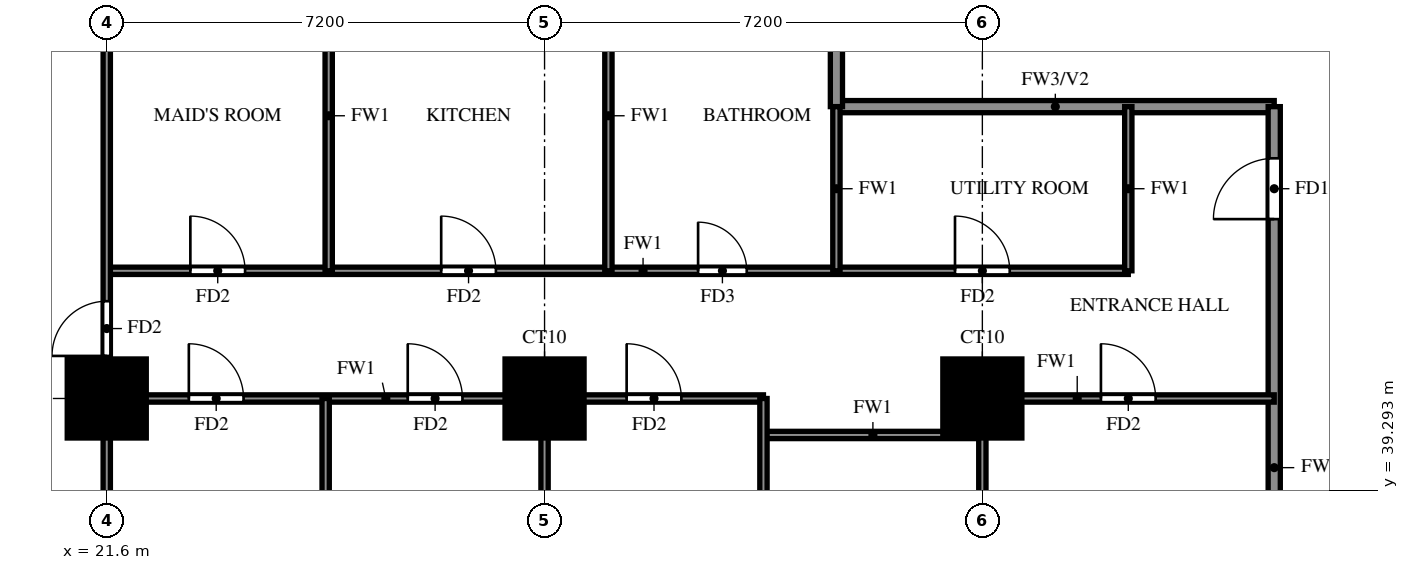
"""IFC4 building model, lengths in metres.
Left out: names, types, materials, properties, quantities, classifications, styles, units other than length and angle.
Written with IfcOpenShell. Run it as: python <this file> out.ifc"""

import sys

from ifc_helpers import new_model, si_unit, direction, frame, frame_2d, origin, origin_2d, place, context, subcontext, project, spatial, rectangle, extrude, source, transform, mapped, element, fill, save


model = new_model("IFC4")
c1 = context("Model", 3, precision=1e-05, world=origin(), true_north=direction((0.0, 1.0)))
c2 = subcontext(c1, "Body", "Model", "MODEL_VIEW")
j1 = project(units=[si_unit("LENGTHUNIT", "METRE"), si_unit("PLANEANGLEUNIT", "RADIAN")], contexts=[c1])
p1 = place(None, origin())
s1 = spatial("IfcSite", under=j1, at=p1, CompositionType="ELEMENT")
p2 = place(p1, origin())
s2 = spatial("IfcBuilding", under=s1, at=p2, CompositionType="ELEMENT")
p3 = place(p2, frame((0.0, 0.0, 69.0)))
s3 = spatial("IfcBuildingStorey", under=s2, at=p3, CompositionType="ELEMENT", Elevation=69.0)
m1 = source(origin(), c2, "Body", "SweptSolid", [
    extrude(rectangle(XDim=1.3, YDim=1.3, at=origin_2d()), origin(), (0.0, 0.0, 1.0), 3.18),
])
for number, where, z_axis, x_axis in (
    (1, (21.6, 40.8, 0.0), (0.0, 0.0, 1.0), (1.0, 0.0, 0.0)),
    (2, (28.8, 40.8, 0.0), (0.0, 0.0, 1.0), (1.0, 0.0, 0.0)),
    (3, (36.0, 40.8, 0.0), (0.0, 0.0, 1.0), (1.0, 0.0, 0.0)),
):
    element("IfcColumn", number, at=place(p3, frame(where, z_axis=z_axis, x_axis=x_axis)), inside=s3, PredefinedType="COLUMN", context=c2, shape_type="MappedRepresentation", body=[
        mapped(m1, transform((0.0, 0.0, 0.0))),
    ])
p4 = place(p3, frame((33.6, 45.6, 0.0), z_axis=(0.0, 0.0, 1.0), x_axis=(1.0, 0.0, 0.0)))
e4 = element("IfcWall", 4, at=p4, inside=s3, PredefinedType="SOLIDWALL", context=c2, shape_type="SweptSolid", body=[
    extrude(rectangle(XDim=7.2, YDim=0.2, at=frame_2d((3.6, 0.0))), origin(), (0.0, 0.0, 1.0), 3.18),
])
p5 = place(p3, frame((33.6, 45.6, 0.0), z_axis=(0.0, 0.0, 1.0), x_axis=(0.0, 1.0, 0.0)))
e5 = element("IfcWall", 5, at=p5, inside=s3, PredefinedType="SOLIDWALL", context=c2, shape_type="SweptSolid", body=[
    extrude(rectangle(XDim=12.0, YDim=0.2, at=frame_2d((6.0, 0.0))), origin(), (0.0, 0.0, 1.0), 3.18),
])
p6 = place(p3, frame((40.8, 33.725, 0.0), z_axis=(0.0, 0.0, 1.0), x_axis=(0.0, 1.0, 0.0)))
e6 = element("IfcWall", 6, at=p6, inside=s3, PredefinedType="SOLIDWALL", context=c2, shape_type="SweptSolid", body=[
    extrude(rectangle(XDim=11.875, YDim=0.2, at=frame_2d((5.938, 0.0))), origin(), (0.0, 0.0, 1.0), 2.28),
])
p7 = place(p6, frame((10.025, 0.0, 0.0)))
e7 = element("IfcOpeningElement", 7, at=p7, cuts=e6, PredefinedType="OPENING", context=c2, shape_type="SweptSolid", body=[
    extrude(rectangle(XDim=1.0, YDim=2.1, at=frame_2d((0.5, 1.05))), frame((0.0, 0.11, 0.0), z_axis=(0.0, -1.0, 0.0), x_axis=(1.0, 0.0, 0.0)), (0.0, 0.0, 1.0), 0.22),
])
p8 = place(p3, frame((32.4, 40.2, 0.0), z_axis=(0.0, 0.0, 1.0), x_axis=(1.0, 0.0, 0.0)))
e8 = element("IfcWall", 8, at=p8, inside=s3, PredefinedType="PARTITIONING", context=c2, shape_type="SweptSolid", body=[
    extrude(rectangle(XDim=3.6, YDim=0.12, at=frame_2d((1.8, 0.0))), origin(), (0.0, 0.0, 1.0), 3.18),
])
p9 = place(p3, frame((21.6, 40.8, 0.0), z_axis=(0.0, 0.0, 1.0), x_axis=(1.0, 0.0, 0.0)))
e9 = element("IfcWall", 9, at=p9, inside=s3, PredefinedType="PARTITIONING", context=c2, shape_type="SweptSolid", body=[
    extrude(rectangle(XDim=10.8, YDim=0.12, at=frame_2d((5.4, 0.0))), origin(), (0.0, 0.0, 1.0), 3.18),
])
p10 = place(p9, frame((1.35, 0.0, 0.0)))
e10 = element("IfcOpeningElement", 10, at=p10, cuts=e9, PredefinedType="OPENING", context=c2, shape_type="SweptSolid", body=[
    extrude(rectangle(XDim=0.9, YDim=2.1, at=frame_2d((0.45, 1.05))), frame((0.0, 0.07, 0.0), z_axis=(0.0, -1.0, 0.0), x_axis=(1.0, 0.0, 0.0)), (0.0, 0.0, 1.0), 0.14),
])
p11 = place(p9, frame((4.95, 0.0, 0.0)))
e11 = element("IfcOpeningElement", 11, at=p11, cuts=e9, PredefinedType="OPENING", context=c2, shape_type="SweptSolid", body=[
    extrude(rectangle(XDim=0.9, YDim=2.1, at=frame_2d((0.45, 1.05))), frame((0.0, 0.07, 0.0), z_axis=(0.0, -1.0, 0.0), x_axis=(1.0, 0.0, 0.0)), (0.0, 0.0, 1.0), 0.14),
])
p12 = place(p9, frame((8.55, 0.0, 0.0)))
e12 = element("IfcOpeningElement", 12, at=p12, cuts=e9, PredefinedType="OPENING", context=c2, shape_type="SweptSolid", body=[
    extrude(rectangle(XDim=0.9, YDim=2.1, at=frame_2d((0.45, 1.05))), frame((0.0, 0.07, 0.0), z_axis=(0.0, -1.0, 0.0), x_axis=(1.0, 0.0, 0.0)), (0.0, 0.0, 1.0), 0.14),
])
p13 = place(p3, frame((36.0, 40.8, 0.0), z_axis=(0.0, 0.0, 1.0), x_axis=(1.0, 0.0, 0.0)))
e13 = element("IfcWall", 13, at=p13, inside=s3, PredefinedType="PARTITIONING", context=c2, shape_type="SweptSolid", body=[
    extrude(rectangle(XDim=4.8, YDim=0.12, at=frame_2d((2.4, 0.0))), origin(), (0.0, 0.0, 1.0), 3.18),
])
p14 = place(p13, frame((1.95, 0.0, 0.0)))
e14 = element("IfcOpeningElement", 14, at=p14, cuts=e13, PredefinedType="OPENING", context=c2, shape_type="SweptSolid", body=[
    extrude(rectangle(XDim=0.9, YDim=2.1, at=frame_2d((0.45, 1.05))), frame((0.0, 0.07, 0.0), z_axis=(0.0, -1.0, 0.0), x_axis=(1.0, 0.0, 0.0)), (0.0, 0.0, 1.0), 0.14),
])
p15 = place(p3, frame((21.6, 42.9, 0.0), z_axis=(0.0, 0.0, 1.0), x_axis=(1.0, 0.0, 0.0)))
e15 = element("IfcWall", 15, at=p15, inside=s3, PredefinedType="PARTITIONING", context=c2, shape_type="SweptSolid", body=[
    extrude(rectangle(XDim=16.8, YDim=0.12, at=frame_2d((8.4, 0.0))), origin(), (0.0, 0.0, 1.0), 3.18),
])
p16 = place(p15, frame((1.375, 0.0, 0.0)))
e16 = element("IfcOpeningElement", 16, at=p16, cuts=e15, PredefinedType="OPENING", context=c2, shape_type="SweptSolid", body=[
    extrude(rectangle(XDim=0.9, YDim=2.1, at=frame_2d((0.45, 1.05))), frame((0.0, 0.07, 0.0), z_axis=(0.0, -1.0, 0.0), x_axis=(1.0, 0.0, 0.0)), (0.0, 0.0, 1.0), 0.14),
])
p17 = place(p15, frame((5.5, 0.0, 0.0)))
e17 = element("IfcOpeningElement", 17, at=p17, cuts=e15, PredefinedType="OPENING", context=c2, shape_type="SweptSolid", body=[
    extrude(rectangle(XDim=0.9, YDim=2.1, at=frame_2d((0.45, 1.05))), frame((0.0, 0.07, 0.0), z_axis=(0.0, -1.0, 0.0), x_axis=(1.0, 0.0, 0.0)), (0.0, 0.0, 1.0), 0.14),
])
p18 = place(p15, frame((9.725, 0.0, 0.0)))
e18 = element("IfcOpeningElement", 18, at=p18, cuts=e15, PredefinedType="OPENING", context=c2, shape_type="SweptSolid", body=[
    extrude(rectangle(XDim=0.8, YDim=2.1, at=frame_2d((0.4, 1.05))), frame((0.0, 0.07, 0.0), z_axis=(0.0, -1.0, 0.0), x_axis=(1.0, 0.0, 0.0)), (0.0, 0.0, 1.0), 0.14),
])
p19 = place(p15, frame((13.95, 0.0, 0.0)))
e19 = element("IfcOpeningElement", 19, at=p19, cuts=e15, PredefinedType="OPENING", context=c2, shape_type="SweptSolid", body=[
    extrude(rectangle(XDim=0.9, YDim=2.1, at=frame_2d((0.45, 1.05))), frame((0.0, 0.07, 0.0), z_axis=(0.0, -1.0, 0.0), x_axis=(1.0, 0.0, 0.0)), (0.0, 0.0, 1.0), 0.14),
])
p20 = place(p3, frame((21.6, 33.725, 0.0), z_axis=(0.0, 0.0, 1.0), x_axis=(0.0, 1.0, 0.0)))
e20 = element("IfcWall", 20, at=p20, inside=s3, PredefinedType="PARTITIONING", context=c2, shape_type="SweptSolid", body=[
    extrude(rectangle(XDim=39.475, YDim=0.12, at=frame_2d((19.737, 0.0))), origin(), (0.0, 0.0, 1.0), 3.18),
])
p21 = place(p20, frame((7.775, 0.0, 0.0)))
e21 = element("IfcOpeningElement", 21, at=p21, cuts=e20, PredefinedType="OPENING", context=c2, shape_type="SweptSolid", body=[
    extrude(rectangle(XDim=0.9, YDim=2.1, at=frame_2d((0.45, 1.05))), frame((0.0, 0.07, 0.0), z_axis=(0.0, -1.0, 0.0), x_axis=(1.0, 0.0, 0.0)), (0.0, 0.0, 1.0), 0.14),
])
p22 = place(p20, frame((15.625, 0.0, 0.0)))
e22 = element("IfcOpeningElement", 22, at=p22, cuts=e20, PredefinedType="OPENING", context=c2, shape_type="SweptSolid", body=[
    extrude(rectangle(XDim=0.9, YDim=2.1, at=frame_2d((0.45, 1.05))), frame((0.0, 0.07, 0.0), z_axis=(0.0, -1.0, 0.0), x_axis=(1.0, 0.0, 0.0)), (0.0, 0.0, 1.0), 0.14),
])
p23 = place(p20, frame((19.225, 0.0, 0.0)))
e23 = element("IfcOpeningElement", 23, at=p23, cuts=e20, PredefinedType="OPENING", context=c2, shape_type="SweptSolid", body=[
    extrude(rectangle(XDim=0.9, YDim=2.1, at=frame_2d((0.45, 1.05))), frame((0.0, 0.07, 0.0), z_axis=(0.0, -1.0, 0.0), x_axis=(1.0, 0.0, 0.0)), (0.0, 0.0, 1.0), 0.14),
])
p24 = place(p20, frame((24.325, 0.0, 0.0)))
e24 = element("IfcOpeningElement", 24, at=p24, cuts=e20, PredefinedType="OPENING", context=c2, shape_type="SweptSolid", body=[
    extrude(rectangle(XDim=1.5, YDim=2.1, at=frame_2d((0.75, 1.05))), frame((0.0, 0.07, 0.0), z_axis=(0.0, -1.0, 0.0), x_axis=(1.0, 0.0, 0.0)), (0.0, 0.0, 1.0), 0.14),
])
p25 = place(p20, frame((30.025, 0.0, 0.0)))
e25 = element("IfcOpeningElement", 25, at=p25, cuts=e20, PredefinedType="OPENING", context=c2, shape_type="SweptSolid", body=[
    extrude(rectangle(XDim=0.9, YDim=2.1, at=frame_2d((0.45, 1.05))), frame((0.0, 0.07, 0.0), z_axis=(0.0, -1.0, 0.0), x_axis=(1.0, 0.0, 0.0)), (0.0, 0.0, 1.0), 0.14),
])
p26 = place(p20, frame((33.625, 0.0, 0.0)))
e26 = element("IfcOpeningElement", 26, at=p26, cuts=e20, PredefinedType="OPENING", context=c2, shape_type="SweptSolid", body=[
    extrude(rectangle(XDim=0.9, YDim=2.1, at=frame_2d((0.45, 1.05))), frame((0.0, 0.07, 0.0), z_axis=(0.0, -1.0, 0.0), x_axis=(1.0, 0.0, 0.0)), (0.0, 0.0, 1.0), 0.14),
])
p27 = place(p20, frame((37.225, 0.0, 0.0)))
e27 = element("IfcOpeningElement", 27, at=p27, cuts=e20, PredefinedType="OPENING", context=c2, shape_type="SweptSolid", body=[
    extrude(rectangle(XDim=0.9, YDim=2.1, at=frame_2d((0.45, 1.05))), frame((0.0, 0.07, 0.0), z_axis=(0.0, -1.0, 0.0), x_axis=(1.0, 0.0, 0.0)), (0.0, 0.0, 1.0), 0.14),
])
p28 = place(p3, frame((25.2, 33.725, 0.0), z_axis=(0.0, 0.0, 1.0), x_axis=(0.0, 1.0, 0.0)))
e28 = element("IfcWall", 28, at=p28, inside=s3, PredefinedType="PARTITIONING", context=c2, shape_type="SweptSolid", body=[
    extrude(rectangle(XDim=7.075, YDim=0.12, at=frame_2d((3.538, 0.0))), origin(), (0.0, 0.0, 1.0), 2.28),
])
p29 = place(p3, frame((25.25, 42.9, 0.0), z_axis=(0.0, 0.0, 1.0), x_axis=(0.0, 1.0, 0.0)))
e29 = element("IfcWall", 29, at=p29, inside=s3, PredefinedType="PARTITIONING", context=c2, shape_type="SweptSolid", body=[
    extrude(rectangle(XDim=5.1, YDim=0.12, at=frame_2d((2.55, 0.0))), origin(), (0.0, 0.0, 1.0), 3.18),
])
p30 = place(p3, frame((28.8, 33.725, 0.0), z_axis=(0.0, 0.0, 1.0), x_axis=(0.0, 1.0, 0.0)))
e30 = element("IfcWall", 30, at=p30, inside=s3, PredefinedType="PARTITIONING", context=c2, shape_type="SweptSolid", body=[
    extrude(rectangle(XDim=7.075, YDim=0.12, at=frame_2d((3.538, 0.0))), origin(), (0.0, 0.0, 1.0), 3.18),
])
p31 = place(p3, frame((29.85, 42.9, 0.0), z_axis=(0.0, 0.0, 1.0), x_axis=(0.0, 1.0, 0.0)))
e31 = element("IfcWall", 31, at=p31, inside=s3, PredefinedType="PARTITIONING", context=c2, shape_type="SweptSolid", body=[
    extrude(rectangle(XDim=5.1, YDim=0.12, at=frame_2d((2.55, 0.0))), origin(), (0.0, 0.0, 1.0), 3.18),
])
p32 = place(p3, frame((32.4, 33.725, 0.0), z_axis=(0.0, 0.0, 1.0), x_axis=(0.0, 1.0, 0.0)))
e32 = element("IfcWall", 32, at=p32, inside=s3, PredefinedType="PARTITIONING", context=c2, shape_type="SweptSolid", body=[
    extrude(rectangle(XDim=7.075, YDim=0.12, at=frame_2d((3.538, 0.0))), origin(), (0.0, 0.0, 1.0), 2.28),
])
p33 = place(p32, frame((2.837, 0.0, 0.0)))
e33 = element("IfcOpeningElement", 33, at=p33, cuts=e32, PredefinedType="OPENING", context=c2, shape_type="SweptSolid", body=[
    extrude(rectangle(XDim=0.8, YDim=2.1, at=frame_2d((0.4, 1.05))), frame((0.0, 0.07, 0.0), z_axis=(0.0, -1.0, 0.0), x_axis=(1.0, 0.0, 0.0)), (0.0, 0.0, 1.0), 0.14),
])
p34 = place(p3, frame((33.6, 42.9, 0.0), z_axis=(0.0, 0.0, 1.0), x_axis=(0.0, 1.0, 0.0)))
e34 = element("IfcWall", 34, at=p34, inside=s3, PredefinedType="PARTITIONING", context=c2, shape_type="SweptSolid", body=[
    extrude(rectangle(XDim=2.7, YDim=0.12, at=frame_2d((1.35, 0.0))), origin(), (0.0, 0.0, 1.0), 3.18),
])
p35 = place(p3, frame((36.0, 33.725, 0.0), z_axis=(0.0, 0.0, 1.0), x_axis=(0.0, 1.0, 0.0)))
e35 = element("IfcWall", 35, at=p35, inside=s3, PredefinedType="PARTITIONING", context=c2, shape_type="SweptSolid", body=[
    extrude(rectangle(XDim=7.075, YDim=0.12, at=frame_2d((3.538, 0.0))), origin(), (0.0, 0.0, 1.0), 3.18),
])
p36 = place(p3, frame((38.4, 42.9, 0.0), z_axis=(0.0, 0.0, 1.0), x_axis=(0.0, 1.0, 0.0)))
e36 = element("IfcWall", 36, at=p36, inside=s3, PredefinedType="PARTITIONING", context=c2, shape_type="SweptSolid", body=[
    extrude(rectangle(XDim=2.7, YDim=0.12, at=frame_2d((1.35, 0.0))), origin(), (0.0, 0.0, 1.0), 3.18),
])
p37 = place(p7, origin())
e37 = element("IfcDoor", 37, at=p37, inside=s3, OperationType="SINGLE_SWING_LEFT", PredefinedType="DOOR", context=c2, shape_type="SweptSolid", body=[
    extrude(rectangle(XDim=1.0, YDim=2.1, at=frame_2d((0.5, 1.05))), frame((0.0, 0.025, 0.0), z_axis=(0.0, -1.0, 0.0), x_axis=(1.0, 0.0, 0.0)), (0.0, 0.0, 1.0), 0.05),
])
fill(e7, e37)
p38 = place(p21, origin())
e38 = element("IfcDoor", 38, at=p38, inside=s3, OperationType="SINGLE_SWING_LEFT", PredefinedType="DOOR", context=c2, shape_type="SweptSolid", body=[
    extrude(rectangle(XDim=0.9, YDim=2.1, at=frame_2d((0.45, 1.05))), frame((0.0, 0.025, 0.0), z_axis=(0.0, -1.0, 0.0), x_axis=(1.0, 0.0, 0.0)), (0.0, 0.0, 1.0), 0.05),
])
fill(e21, e38)
p39 = place(p10, origin())
e39 = element("IfcDoor", 39, at=p39, inside=s3, OperationType="SINGLE_SWING_LEFT", PredefinedType="DOOR", context=c2, shape_type="SweptSolid", body=[
    extrude(rectangle(XDim=0.9, YDim=2.1, at=frame_2d((0.45, 1.05))), frame((0.0, 0.025, 0.0), z_axis=(0.0, -1.0, 0.0), x_axis=(1.0, 0.0, 0.0)), (0.0, 0.0, 1.0), 0.05),
])
fill(e10, e39)
p40 = place(p11, origin())
e40 = element("IfcDoor", 40, at=p40, inside=s3, OperationType="SINGLE_SWING_LEFT", PredefinedType="DOOR", context=c2, shape_type="SweptSolid", body=[
    extrude(rectangle(XDim=0.9, YDim=2.1, at=frame_2d((0.45, 1.05))), frame((0.0, 0.025, 0.0), z_axis=(0.0, -1.0, 0.0), x_axis=(1.0, 0.0, 0.0)), (0.0, 0.0, 1.0), 0.05),
])
fill(e11, e40)
p41 = place(p12, origin())
e41 = element("IfcDoor", 41, at=p41, inside=s3, OperationType="SINGLE_SWING_RIGHT", PredefinedType="DOOR", context=c2, shape_type="SweptSolid", body=[
    extrude(rectangle(XDim=0.9, YDim=2.1, at=frame_2d((0.45, 1.05))), frame((0.0, 0.025, 0.0), z_axis=(0.0, -1.0, 0.0), x_axis=(1.0, 0.0, 0.0)), (0.0, 0.0, 1.0), 0.05),
])
fill(e12, e41)
p42 = place(p14, origin())
e42 = element("IfcDoor", 42, at=p42, inside=s3, OperationType="SINGLE_SWING_LEFT", PredefinedType="DOOR", context=c2, shape_type="SweptSolid", body=[
    extrude(rectangle(XDim=0.9, YDim=2.1, at=frame_2d((0.45, 1.05))), frame((0.0, 0.025, 0.0), z_axis=(0.0, -1.0, 0.0), x_axis=(1.0, 0.0, 0.0)), (0.0, 0.0, 1.0), 0.05),
])
fill(e14, e42)
p43 = place(p16, origin())
e43 = element("IfcDoor", 43, at=p43, inside=s3, OperationType="SINGLE_SWING_RIGHT", PredefinedType="DOOR", context=c2, shape_type="SweptSolid", body=[
    extrude(rectangle(XDim=0.9, YDim=2.1, at=frame_2d((0.45, 1.05))), frame((0.0, 0.025, 0.0), z_axis=(0.0, -1.0, 0.0), x_axis=(1.0, 0.0, 0.0)), (0.0, 0.0, 1.0), 0.05),
])
fill(e16, e43)
p44 = place(p17, origin())
e44 = element("IfcDoor", 44, at=p44, inside=s3, OperationType="SINGLE_SWING_LEFT", PredefinedType="DOOR", context=c2, shape_type="SweptSolid", body=[
    extrude(rectangle(XDim=0.9, YDim=2.1, at=frame_2d((0.45, 1.05))), frame((0.0, 0.025, 0.0), z_axis=(0.0, -1.0, 0.0), x_axis=(1.0, 0.0, 0.0)), (0.0, 0.0, 1.0), 0.05),
])
fill(e17, e44)
p45 = place(p18, origin())
e45 = element("IfcDoor", 45, at=p45, inside=s3, OperationType="SINGLE_SWING_LEFT", PredefinedType="DOOR", context=c2, shape_type="SweptSolid", body=[
    extrude(rectangle(XDim=0.8, YDim=2.1, at=frame_2d((0.4, 1.05))), frame((0.0, 0.025, 0.0), z_axis=(0.0, -1.0, 0.0), x_axis=(1.0, 0.0, 0.0)), (0.0, 0.0, 1.0), 0.05),
])
fill(e18, e45)
p46 = place(p19, origin())
e46 = element("IfcDoor", 46, at=p46, inside=s3, OperationType="SINGLE_SWING_RIGHT", PredefinedType="DOOR", context=c2, shape_type="SweptSolid", body=[
    extrude(rectangle(XDim=0.9, YDim=2.1, at=frame_2d((0.45, 1.05))), frame((0.0, 0.025, 0.0), z_axis=(0.0, -1.0, 0.0), x_axis=(1.0, 0.0, 0.0)), (0.0, 0.0, 1.0), 0.05),
])
fill(e19, e46)
save(model, sys.argv[1])
